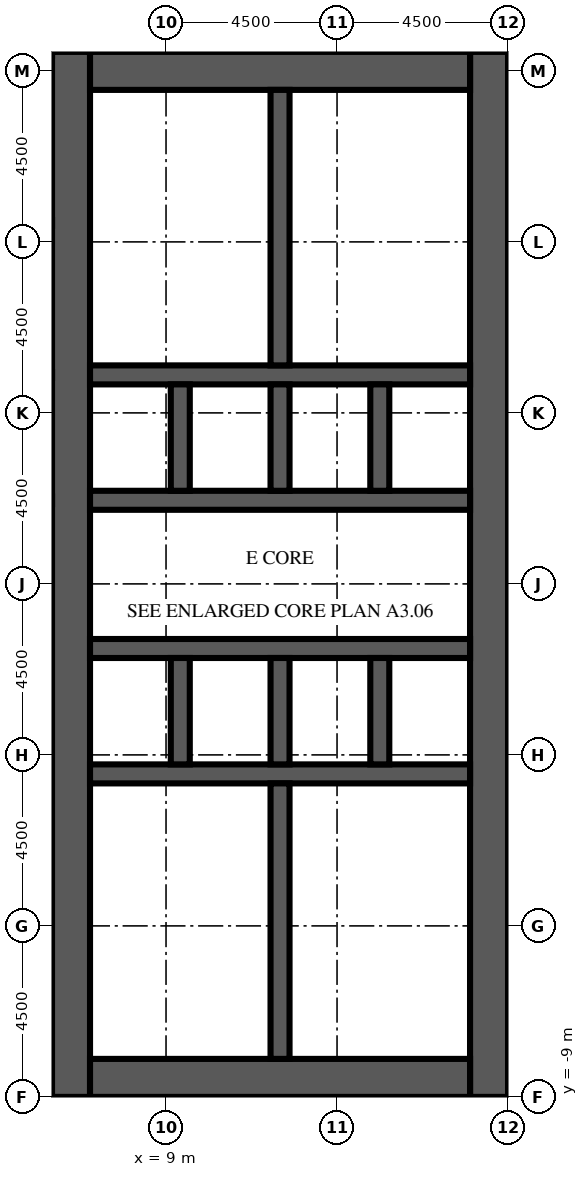
"""IFC4 building model, lengths in metres.
Left out: names, types, materials, properties, quantities, classifications, styles, units other than length and angle.
Written with IfcOpenShell. Run it as: python <this file> out.ifc"""

import sys

from ifc_helpers import new_model, si_unit, direction, frame, frame_2d, origin, place, context, subcontext, project, spatial, rectangle, extrude, element, fill, save


model = new_model("IFC4")
c1 = context("Model", 3, precision=1e-05, world=origin(), true_north=direction((0.0, 1.0)))
c2 = subcontext(c1, "Body", "Model", "MODEL_VIEW")
j1 = project(units=[si_unit("LENGTHUNIT", "METRE"), si_unit("PLANEANGLEUNIT", "RADIAN")], contexts=[c1])
p1 = place(None, origin())
s1 = spatial("IfcSite", under=j1, at=p1, CompositionType="ELEMENT")
p2 = place(p1, origin())
s2 = spatial("IfcBuilding", under=s1, at=p2, CompositionType="ELEMENT")
p3 = place(p2, frame((0.0, 0.0, 31.8)))
s3 = spatial("IfcBuildingStorey", under=s2, at=p3, CompositionType="ELEMENT", Elevation=31.8)
p4 = place(p3, frame((6.5, -9.0, 0.0), z_axis=(0.0, 0.0, 1.0), x_axis=(0.0, 1.0, 0.0)))
e1 = element("IfcWall", 1, at=p4, inside=s3, PredefinedType="SHEAR", context=c2, shape_type="SweptSolid", body=[
    extrude(rectangle(XDim=27.5, YDim=1.0, at=frame_2d((13.75, 0.0))), origin(), (0.0, 0.0, 1.0), 4.1),
])
p5 = place(p4, frame((12.55, 0.0, 0.0)))
e2 = element("IfcOpeningElement", 2, at=p5, cuts=e1, PredefinedType="OPENING", context=c2, shape_type="SweptSolid", body=[
    extrude(rectangle(XDim=2.4, YDim=2.4, at=frame_2d((1.2, 1.2))), frame((0.0, 0.51, 0.0), z_axis=(0.0, -1.0, 0.0), x_axis=(1.0, 0.0, 0.0)), (0.0, 0.0, 1.0), 1.02),
])
p6 = place(p4, frame((4.025, 0.0, 0.0)))
e3 = element("IfcOpeningElement", 3, at=p6, cuts=e1, PredefinedType="OPENING", context=c2, shape_type="SweptSolid", body=[
    extrude(rectangle(XDim=1.2, YDim=2.1, at=frame_2d((0.6, 1.05))), frame((0.0, 0.51, 0.0), z_axis=(0.0, -1.0, 0.0), x_axis=(1.0, 0.0, 0.0)), (0.0, 0.0, 1.0), 1.02),
])
p7 = place(p4, frame((19.475, 0.0, 0.0)))
e4 = element("IfcOpeningElement", 4, at=p7, cuts=e1, PredefinedType="OPENING", context=c2, shape_type="SweptSolid", body=[
    extrude(rectangle(XDim=1.0, YDim=2.1, at=frame_2d((0.5, 1.05))), frame((0.0, 0.51, 0.0), z_axis=(0.0, -1.0, 0.0), x_axis=(1.0, 0.0, 0.0)), (0.0, 0.0, 1.0), 1.02),
])
p8 = place(p4, frame((21.106, 0.0, 0.0)))
e5 = element("IfcOpeningElement", 5, at=p8, cuts=e1, PredefinedType="OPENING", context=c2, shape_type="SweptSolid", body=[
    extrude(rectangle(XDim=1.0, YDim=2.1, at=frame_2d((0.5, 1.05))), frame((0.0, 0.51, 0.0), z_axis=(0.0, -1.0, 0.0), x_axis=(1.0, 0.0, 0.0)), (0.0, 0.0, 1.0), 1.02),
])
p9 = place(p4, frame((23.1, 0.0, 0.0)))
e6 = element("IfcOpeningElement", 6, at=p9, cuts=e1, PredefinedType="OPENING", context=c2, shape_type="SweptSolid", body=[
    extrude(rectangle(XDim=1.0, YDim=2.1, at=frame_2d((0.5, 1.05))), frame((0.0, 0.51, 0.0), z_axis=(0.0, -1.0, 0.0), x_axis=(1.0, 0.0, 0.0)), (0.0, 0.0, 1.0), 1.02),
])
p10 = place(p4, frame((25.094, 0.0, 0.0)))
e7 = element("IfcOpeningElement", 7, at=p10, cuts=e1, PredefinedType="OPENING", context=c2, shape_type="SweptSolid", body=[
    extrude(rectangle(XDim=1.0, YDim=2.1, at=frame_2d((0.5, 1.05))), frame((0.0, 0.51, 0.0), z_axis=(0.0, -1.0, 0.0), x_axis=(1.0, 0.0, 0.0)), (0.0, 0.0, 1.0), 1.02),
])
p11 = place(p3, frame((17.5, -9.0, 0.0), z_axis=(0.0, 0.0, 1.0), x_axis=(0.0, 1.0, 0.0)))
e8 = element("IfcWall", 8, at=p11, inside=s3, PredefinedType="SHEAR", context=c2, shape_type="SweptSolid", body=[
    extrude(rectangle(XDim=27.5, YDim=1.0, at=frame_2d((13.75, 0.0))), origin(), (0.0, 0.0, 1.0), 4.1),
])
p12 = place(p11, frame((12.55, 0.0, 0.0)))
e9 = element("IfcOpeningElement", 9, at=p12, cuts=e8, PredefinedType="OPENING", context=c2, shape_type="SweptSolid", body=[
    extrude(rectangle(XDim=2.4, YDim=2.4, at=frame_2d((1.2, 1.2))), frame((0.0, 0.51, 0.0), z_axis=(0.0, -1.0, 0.0), x_axis=(1.0, 0.0, 0.0)), (0.0, 0.0, 1.0), 1.02),
])
p13 = place(p11, frame((6.825, 0.0, 0.0)))
e10 = element("IfcOpeningElement", 10, at=p13, cuts=e8, PredefinedType="OPENING", context=c2, shape_type="SweptSolid", body=[
    extrude(rectangle(XDim=1.2, YDim=2.1, at=frame_2d((0.6, 1.05))), frame((0.0, 0.51, 0.0), z_axis=(0.0, -1.0, 0.0), x_axis=(1.0, 0.0, 0.0)), (0.0, 0.0, 1.0), 1.02),
])
p14 = place(p11, frame((19.475, 0.0, 0.0)))
e11 = element("IfcOpeningElement", 11, at=p14, cuts=e8, PredefinedType="OPENING", context=c2, shape_type="SweptSolid", body=[
    extrude(rectangle(XDim=1.2, YDim=2.1, at=frame_2d((0.6, 1.05))), frame((0.0, 0.51, 0.0), z_axis=(0.0, -1.0, 0.0), x_axis=(1.0, 0.0, 0.0)), (0.0, 0.0, 1.0), 1.02),
])
for number, where, z_axis, x_axis in (
    (12, (7.0, -8.5, 0.0), (0.0, 0.0, 1.0), (1.0, 0.0, 0.0)),
    (13, (7.0, 18.0, 0.0), (0.0, 0.0, 1.0), (1.0, 0.0, 0.0)),
):
    element("IfcWall", number, at=place(p3, frame(where, z_axis=z_axis, x_axis=x_axis)), inside=s3, PredefinedType="SHEAR", context=c2, shape_type="SweptSolid", body=[
        extrude(rectangle(XDim=10.0, YDim=1.0, at=frame_2d((5.0, 0.0))), origin(), (0.0, 0.0, 1.0), 4.1),
    ])
p15 = place(p3, frame((7.0, -0.5, 0.0), z_axis=(0.0, 0.0, 1.0), x_axis=(1.0, 0.0, 0.0)))
e14 = element("IfcWall", 14, at=p15, inside=s3, PredefinedType="SHEAR", context=c2, shape_type="SweptSolid", body=[
    extrude(rectangle(XDim=10.0, YDim=0.5, at=frame_2d((5.0, 0.0))), origin(), (0.0, 0.0, 1.0), 4.1),
])
p16 = place(p3, frame((7.0, 2.8, 0.0), z_axis=(0.0, 0.0, 1.0), x_axis=(1.0, 0.0, 0.0)))
e15 = element("IfcWall", 15, at=p16, inside=s3, PredefinedType="SHEAR", context=c2, shape_type="SweptSolid", body=[
    extrude(rectangle(XDim=10.0, YDim=0.5, at=frame_2d((5.0, 0.0))), origin(), (0.0, 0.0, 1.0), 4.1),
])
p17 = place(p16, frame((0.512, 0.0, 0.0)))
e16 = element("IfcOpeningElement", 16, at=p17, cuts=e15, PredefinedType="OPENING", context=c2, shape_type="SweptSolid", body=[
    extrude(rectangle(XDim=1.1, YDim=2.1, at=frame_2d((0.55, 1.05))), frame((0.0, 0.26, 0.0), z_axis=(0.0, -1.0, 0.0), x_axis=(1.0, 0.0, 0.0)), (0.0, 0.0, 1.0), 0.52),
])
p18 = place(p16, frame((3.137, 0.0, 0.0)))
e17 = element("IfcOpeningElement", 17, at=p18, cuts=e15, PredefinedType="OPENING", context=c2, shape_type="SweptSolid", body=[
    extrude(rectangle(XDim=1.1, YDim=2.1, at=frame_2d((0.55, 1.05))), frame((0.0, 0.26, 0.0), z_axis=(0.0, -1.0, 0.0), x_axis=(1.0, 0.0, 0.0)), (0.0, 0.0, 1.0), 0.52),
])
p19 = place(p16, frame((8.387, 0.0, 0.0)))
e18 = element("IfcOpeningElement", 18, at=p19, cuts=e15, PredefinedType="OPENING", context=c2, shape_type="SweptSolid", body=[
    extrude(rectangle(XDim=1.1, YDim=2.1, at=frame_2d((0.55, 1.05))), frame((0.0, 0.26, 0.0), z_axis=(0.0, -1.0, 0.0), x_axis=(1.0, 0.0, 0.0)), (0.0, 0.0, 1.0), 0.52),
])
p20 = place(p3, frame((7.0, 6.7, 0.0), z_axis=(0.0, 0.0, 1.0), x_axis=(1.0, 0.0, 0.0)))
e19 = element("IfcWall", 19, at=p20, inside=s3, PredefinedType="SHEAR", context=c2, shape_type="SweptSolid", body=[
    extrude(rectangle(XDim=10.0, YDim=0.5, at=frame_2d((5.0, 0.0))), origin(), (0.0, 0.0, 1.0), 4.1),
])
p21 = place(p20, frame((0.512, 0.0, 0.0)))
e20 = element("IfcOpeningElement", 20, at=p21, cuts=e19, PredefinedType="OPENING", context=c2, shape_type="SweptSolid", body=[
    extrude(rectangle(XDim=1.1, YDim=2.1, at=frame_2d((0.55, 1.05))), frame((0.0, 0.26, 0.0), z_axis=(0.0, -1.0, 0.0), x_axis=(1.0, 0.0, 0.0)), (0.0, 0.0, 1.0), 0.52),
])
p22 = place(p20, frame((3.188, 0.0, 0.0)))
e21 = element("IfcOpeningElement", 21, at=p22, cuts=e19, PredefinedType="OPENING", context=c2, shape_type="SweptSolid", body=[
    extrude(rectangle(XDim=1.0, YDim=2.1, at=frame_2d((0.5, 1.05))), frame((0.0, 0.26, 0.0), z_axis=(0.0, -1.0, 0.0), x_axis=(1.0, 0.0, 0.0)), (0.0, 0.0, 1.0), 0.52),
])
p23 = place(p20, frame((5.812, 0.0, 0.0)))
e22 = element("IfcOpeningElement", 22, at=p23, cuts=e19, PredefinedType="OPENING", context=c2, shape_type="SweptSolid", body=[
    extrude(rectangle(XDim=1.0, YDim=2.1, at=frame_2d((0.5, 1.05))), frame((0.0, 0.26, 0.0), z_axis=(0.0, -1.0, 0.0), x_axis=(1.0, 0.0, 0.0)), (0.0, 0.0, 1.0), 0.52),
])
p24 = place(p20, frame((8.438, 0.0, 0.0)))
e23 = element("IfcOpeningElement", 23, at=p24, cuts=e19, PredefinedType="OPENING", context=c2, shape_type="SweptSolid", body=[
    extrude(rectangle(XDim=1.0, YDim=2.1, at=frame_2d((0.5, 1.05))), frame((0.0, 0.26, 0.0), z_axis=(0.0, -1.0, 0.0), x_axis=(1.0, 0.0, 0.0)), (0.0, 0.0, 1.0), 0.52),
])
p25 = place(p3, frame((7.0, 10.0, 0.0), z_axis=(0.0, 0.0, 1.0), x_axis=(1.0, 0.0, 0.0)))
e24 = element("IfcWall", 24, at=p25, inside=s3, PredefinedType="SHEAR", context=c2, shape_type="SweptSolid", body=[
    extrude(rectangle(XDim=10.0, YDim=0.5, at=frame_2d((5.0, 0.0))), origin(), (0.0, 0.0, 1.0), 4.1),
])
for number, where, z_axis, x_axis in (
    (25, (9.375, -0.25, 0.0), (0.0, 0.0, 1.0), (0.0, 1.0, 0.0)),
    (26, (9.375, 6.95, 0.0), (0.0, 0.0, 1.0), (0.0, 1.0, 0.0)),
    (27, (12.0, -0.25, 0.0), (0.0, 0.0, 1.0), (0.0, 1.0, 0.0)),
    (28, (12.0, 6.95, 0.0), (0.0, 0.0, 1.0), (0.0, 1.0, 0.0)),
    (29, (14.625, -0.25, 0.0), (0.0, 0.0, 1.0), (0.0, 1.0, 0.0)),
    (30, (14.625, 6.95, 0.0), (0.0, 0.0, 1.0), (0.0, 1.0, 0.0)),
):
    element("IfcWall", number, at=place(p3, frame(where, z_axis=z_axis, x_axis=x_axis)), inside=s3, PredefinedType="SHEAR", context=c2, shape_type="SweptSolid", body=[
        extrude(rectangle(XDim=2.8, YDim=0.5, at=frame_2d((1.4, 0.0))), origin(), (0.0, 0.0, 1.0), 4.1),
    ])
for number, where, z_axis, x_axis in (
    (31, (12.0, -8.0, 0.0), (0.0, 0.0, 1.0), (0.0, 1.0, 0.0)),
    (32, (12.0, 10.25, 0.0), (0.0, 0.0, 1.0), (0.0, 1.0, 0.0)),
):
    element("IfcWall", number, at=place(p3, frame(where, z_axis=z_axis, x_axis=x_axis)), inside=s3, PredefinedType="SHEAR", context=c2, shape_type="SweptSolid", body=[
        extrude(rectangle(XDim=7.25, YDim=0.5, at=frame_2d((3.625, 0.0))), origin(), (0.0, 0.0, 1.0), 4.1),
    ])
p26 = place(p3, frame((7.0, -5.825, 0.0), z_axis=(0.0, 0.0, 1.0), x_axis=(1.0, 0.0, 0.0)))
e33 = element("IfcWall", 33, at=p26, inside=s3, PredefinedType="PARTITIONING", context=c2, shape_type="SweptSolid", body=[
    extrude(rectangle(XDim=1.6, YDim=0.1, at=frame_2d((0.8, 0.0))), origin(), (0.0, 0.0, 1.0), 3.5),
])
p27 = place(p26, frame((0.3, 0.0, 0.0)))
e34 = element("IfcOpeningElement", 34, at=p27, cuts=e33, PredefinedType="OPENING", context=c2, shape_type="SweptSolid", body=[
    extrude(rectangle(XDim=1.0, YDim=2.1, at=frame_2d((0.5, 1.05))), frame((0.0, 0.06, 0.0), z_axis=(0.0, -1.0, 0.0), x_axis=(1.0, 0.0, 0.0)), (0.0, 0.0, 1.0), 0.12),
])
p28 = place(p3, frame((7.0, -2.925, 0.0), z_axis=(0.0, 0.0, 1.0), x_axis=(1.0, 0.0, 0.0)))
e35 = element("IfcWall", 35, at=p28, inside=s3, PredefinedType="PARTITIONING", context=c2, shape_type="SweptSolid", body=[
    extrude(rectangle(XDim=1.6, YDim=0.1, at=frame_2d((0.8, 0.0))), origin(), (0.0, 0.0, 1.0), 3.5),
])
p29 = place(p28, frame((0.3, 0.0, 0.0)))
e36 = element("IfcOpeningElement", 36, at=p29, cuts=e35, PredefinedType="OPENING", context=c2, shape_type="SweptSolid", body=[
    extrude(rectangle(XDim=1.0, YDim=2.1, at=frame_2d((0.5, 1.05))), frame((0.0, 0.06, 0.0), z_axis=(0.0, -1.0, 0.0), x_axis=(1.0, 0.0, 0.0)), (0.0, 0.0, 1.0), 0.12),
])
p30 = place(p3, frame((8.6, -5.825, 0.0), z_axis=(0.0, 0.0, 1.0), x_axis=(0.0, 1.0, 0.0)))
e37 = element("IfcWall", 37, at=p30, inside=s3, PredefinedType="PARTITIONING", context=c2, shape_type="SweptSolid", body=[
    extrude(rectangle(XDim=2.9, YDim=0.1, at=frame_2d((1.45, 0.0))), origin(), (0.0, 0.0, 1.0), 3.5),
])
p31 = place(p30, frame((0.95, 0.0, 0.0)))
e38 = element("IfcOpeningElement", 38, at=p31, cuts=e37, PredefinedType="OPENING", context=c2, shape_type="SweptSolid", body=[
    extrude(rectangle(XDim=1.0, YDim=2.1, at=frame_2d((0.5, 1.05))), frame((0.0, 0.06, 0.0), z_axis=(0.0, -1.0, 0.0), x_axis=(1.0, 0.0, 0.0)), (0.0, 0.0, 1.0), 0.12),
])
for number, where, z_axis, x_axis in (
    (39, (8.6, -5.825, 0.0), (0.0, 0.0, 1.0), (1.0, 0.0, 0.0)),
    (40, (8.6, -2.925, 0.0), (0.0, 0.0, 1.0), (1.0, 0.0, 0.0)),
):
    element("IfcWall", number, at=place(p3, frame(where, z_axis=z_axis, x_axis=x_axis)), inside=s3, PredefinedType="PARTITIONING", context=c2, shape_type="SweptSolid", body=[
        extrude(rectangle(XDim=3.15, YDim=0.1, at=frame_2d((1.575, 0.0))), origin(), (0.0, 0.0, 1.0), 3.5),
    ])
for number, where, z_axis, x_axis in (
    (41, (7.0, 11.7, 0.0), (0.0, 0.0, 1.0), (1.0, 0.0, 0.0)),
    (42, (7.0, 13.512, 0.0), (0.0, 0.0, 1.0), (1.0, 0.0, 0.0)),
    (43, (7.0, 15.688, 0.0), (0.0, 0.0, 1.0), (1.0, 0.0, 0.0)),
):
    element("IfcWall", number, at=place(p3, frame(where, z_axis=z_axis, x_axis=x_axis)), inside=s3, PredefinedType="PARTITIONING", context=c2, shape_type="SweptSolid", body=[
        extrude(rectangle(XDim=4.75, YDim=0.1, at=frame_2d((2.375, 0.0))), origin(), (0.0, 0.0, 1.0), 3.5),
    ])
p32 = place(p17, origin())
e44 = element("IfcDoor", 44, at=p32, inside=s3, OperationType="DOUBLE_DOOR_SLIDING", PredefinedType="DOOR", context=c2, shape_type="SweptSolid", body=[
    extrude(rectangle(XDim=1.1, YDim=2.1, at=frame_2d((0.55, 1.05))), frame((0.0, 0.025, 0.0), z_axis=(0.0, -1.0, 0.0), x_axis=(1.0, 0.0, 0.0)), (0.0, 0.0, 1.0), 0.05),
])
fill(e16, e44)
p33 = place(p18, origin())
e45 = element("IfcDoor", 45, at=p33, inside=s3, OperationType="DOUBLE_DOOR_SLIDING", PredefinedType="DOOR", context=c2, shape_type="SweptSolid", body=[
    extrude(rectangle(XDim=1.1, YDim=2.1, at=frame_2d((0.55, 1.05))), frame((0.0, 0.025, 0.0), z_axis=(0.0, -1.0, 0.0), x_axis=(1.0, 0.0, 0.0)), (0.0, 0.0, 1.0), 0.05),
])
fill(e17, e45)
p34 = place(p19, origin())
e46 = element("IfcDoor", 46, at=p34, inside=s3, OperationType="DOUBLE_DOOR_SLIDING", PredefinedType="DOOR", context=c2, shape_type="SweptSolid", body=[
    extrude(rectangle(XDim=1.1, YDim=2.1, at=frame_2d((0.55, 1.05))), frame((0.0, 0.025, 0.0), z_axis=(0.0, -1.0, 0.0), x_axis=(1.0, 0.0, 0.0)), (0.0, 0.0, 1.0), 0.05),
])
fill(e18, e46)
p35 = place(p21, origin())
e47 = element("IfcDoor", 47, at=p35, inside=s3, OperationType="DOUBLE_DOOR_SLIDING", PredefinedType="DOOR", context=c2, shape_type="SweptSolid", body=[
    extrude(rectangle(XDim=1.1, YDim=2.1, at=frame_2d((0.55, 1.05))), frame((0.0, 0.025, 0.0), z_axis=(0.0, -1.0, 0.0), x_axis=(1.0, 0.0, 0.0)), (0.0, 0.0, 1.0), 0.05),
])
fill(e20, e47)
p36 = place(p5, origin())
e48 = element("IfcDoor", 48, at=p36, inside=s3, OperationType="DOUBLE_DOOR_DOUBLE_SWING", PredefinedType="DOOR", context=c2, shape_type="SweptSolid", body=[
    extrude(rectangle(XDim=2.4, YDim=2.4, at=frame_2d((1.2, 1.2))), frame((0.0, 0.025, 0.0), z_axis=(0.0, -1.0, 0.0), x_axis=(1.0, 0.0, 0.0)), (0.0, 0.0, 1.0), 0.05),
])
fill(e2, e48)
p37 = place(p12, origin())
e49 = element("IfcDoor", 49, at=p37, inside=s3, OperationType="DOUBLE_DOOR_DOUBLE_SWING", PredefinedType="DOOR", context=c2, shape_type="SweptSolid", body=[
    extrude(rectangle(XDim=2.4, YDim=2.4, at=frame_2d((1.2, 1.2))), frame((0.0, 0.025, 0.0), z_axis=(0.0, -1.0, 0.0), x_axis=(1.0, 0.0, 0.0)), (0.0, 0.0, 1.0), 0.05),
])
fill(e9, e49)
p38 = place(p13, frame((1.2, 0.0, 0.0), z_axis=(0.0, 0.0, 1.0), x_axis=(-1.0, 0.0, 0.0)))
e50 = element("IfcDoor", 50, at=p38, inside=s3, OperationType="SINGLE_SWING_LEFT", PredefinedType="DOOR", context=c2, shape_type="SweptSolid", body=[
    extrude(rectangle(XDim=1.2, YDim=2.1, at=frame_2d((0.6, 1.05))), frame((0.0, 0.025, 0.0), z_axis=(0.0, -1.0, 0.0), x_axis=(1.0, 0.0, 0.0)), (0.0, 0.0, 1.0), 0.05),
])
fill(e10, e50)
p39 = place(p14, frame((1.2, 0.0, 0.0), z_axis=(0.0, 0.0, 1.0), x_axis=(-1.0, 0.0, 0.0)))
e51 = element("IfcDoor", 51, at=p39, inside=s3, OperationType="SINGLE_SWING_LEFT", PredefinedType="DOOR", context=c2, shape_type="SweptSolid", body=[
    extrude(rectangle(XDim=1.2, YDim=2.1, at=frame_2d((0.6, 1.05))), frame((0.0, 0.025, 0.0), z_axis=(0.0, -1.0, 0.0), x_axis=(1.0, 0.0, 0.0)), (0.0, 0.0, 1.0), 0.05),
])
fill(e11, e51)
p40 = place(p22, origin())
e52 = element("IfcDoor", 52, at=p40, inside=s3, OperationType="SINGLE_SWING_RIGHT", PredefinedType="DOOR", context=c2, shape_type="SweptSolid", body=[
    extrude(rectangle(XDim=1.0, YDim=2.1, at=frame_2d((0.5, 1.05))), frame((0.0, 0.025, 0.0), z_axis=(0.0, -1.0, 0.0), x_axis=(1.0, 0.0, 0.0)), (0.0, 0.0, 1.0), 0.05),
])
fill(e21, e52)
p41 = place(p23, origin())
e53 = element("IfcDoor", 53, at=p41, inside=s3, OperationType="SINGLE_SWING_LEFT", PredefinedType="DOOR", context=c2, shape_type="SweptSolid", body=[
    extrude(rectangle(XDim=1.0, YDim=2.1, at=frame_2d((0.5, 1.05))), frame((0.0, 0.025, 0.0), z_axis=(0.0, -1.0, 0.0), x_axis=(1.0, 0.0, 0.0)), (0.0, 0.0, 1.0), 0.05),
])
fill(e22, e53)
p42 = place(p24, origin())
e54 = element("IfcDoor", 54, at=p42, inside=s3, OperationType="SINGLE_SWING_RIGHT", PredefinedType="DOOR", context=c2, shape_type="SweptSolid", body=[
    extrude(rectangle(XDim=1.0, YDim=2.1, at=frame_2d((0.5, 1.05))), frame((0.0, 0.025, 0.0), z_axis=(0.0, -1.0, 0.0), x_axis=(1.0, 0.0, 0.0)), (0.0, 0.0, 1.0), 0.05),
])
fill(e23, e54)
p43 = place(p6, origin())
e55 = element("IfcDoor", 55, at=p43, inside=s3, OperationType="SINGLE_SWING_RIGHT", PredefinedType="DOOR", context=c2, shape_type="SweptSolid", body=[
    extrude(rectangle(XDim=1.2, YDim=2.1, at=frame_2d((0.6, 1.05))), frame((0.0, -0.425, 0.0), z_axis=(0.0, -1.0, 0.0), x_axis=(1.0, 0.0, 0.0)), (0.0, 0.0, 1.0), 0.05),
])
fill(e3, e55)
p44 = place(p27, origin())
e56 = element("IfcDoor", 56, at=p44, inside=s3, OperationType="SINGLE_SWING_LEFT", PredefinedType="DOOR", context=c2, shape_type="SweptSolid", body=[
    extrude(rectangle(XDim=1.0, YDim=2.1, at=frame_2d((0.5, 1.05))), frame((0.0, 0.025, 0.0), z_axis=(0.0, -1.0, 0.0), x_axis=(1.0, 0.0, 0.0)), (0.0, 0.0, 1.0), 0.05),
])
fill(e34, e56)
p45 = place(p29, origin())
e57 = element("IfcDoor", 57, at=p45, inside=s3, OperationType="SINGLE_SWING_RIGHT", PredefinedType="DOOR", context=c2, shape_type="SweptSolid", body=[
    extrude(rectangle(XDim=1.0, YDim=2.1, at=frame_2d((0.5, 1.05))), frame((0.0, 0.025, 0.0), z_axis=(0.0, -1.0, 0.0), x_axis=(1.0, 0.0, 0.0)), (0.0, 0.0, 1.0), 0.05),
])
fill(e36, e57)
p46 = place(p31, origin())
e58 = element("IfcDoor", 58, at=p46, inside=s3, OperationType="SINGLE_SWING_LEFT", PredefinedType="DOOR", context=c2, shape_type="SweptSolid", body=[
    extrude(rectangle(XDim=1.0, YDim=2.1, at=frame_2d((0.5, 1.05))), frame((0.0, 0.025, 0.0), z_axis=(0.0, -1.0, 0.0), x_axis=(1.0, 0.0, 0.0)), (0.0, 0.0, 1.0), 0.05),
])
fill(e38, e58)
p47 = place(p7, origin())
e59 = element("IfcDoor", 59, at=p47, inside=s3, OperationType="SINGLE_SWING_RIGHT", PredefinedType="DOOR", context=c2, shape_type="SweptSolid", body=[
    extrude(rectangle(XDim=1.0, YDim=2.1, at=frame_2d((0.5, 1.05))), frame((0.0, -0.425, 0.0), z_axis=(0.0, -1.0, 0.0), x_axis=(1.0, 0.0, 0.0)), (0.0, 0.0, 1.0), 0.05),
])
fill(e4, e59)
p48 = place(p8, origin())
e60 = element("IfcDoor", 60, at=p48, inside=s3, OperationType="SINGLE_SWING_LEFT", PredefinedType="DOOR", context=c2, shape_type="SweptSolid", body=[
    extrude(rectangle(XDim=1.0, YDim=2.1, at=frame_2d((0.5, 1.05))), frame((0.0, -0.425, 0.0), z_axis=(0.0, -1.0, 0.0), x_axis=(1.0, 0.0, 0.0)), (0.0, 0.0, 1.0), 0.05),
])
fill(e5, e60)
p49 = place(p9, origin())
e61 = element("IfcDoor", 61, at=p49, inside=s3, OperationType="SINGLE_SWING_RIGHT", PredefinedType="DOOR", context=c2, shape_type="SweptSolid", body=[
    extrude(rectangle(XDim=1.0, YDim=2.1, at=frame_2d((0.5, 1.05))), frame((0.0, -0.425, 0.0), z_axis=(0.0, -1.0, 0.0), x_axis=(1.0, 0.0, 0.0)), (0.0, 0.0, 1.0), 0.05),
])
fill(e6, e61)
p50 = place(p10, origin())
e62 = element("IfcDoor", 62, at=p50, inside=s3, OperationType="SINGLE_SWING_LEFT", PredefinedType="DOOR", context=c2, shape_type="SweptSolid", body=[
    extrude(rectangle(XDim=1.0, YDim=2.1, at=frame_2d((0.5, 1.05))), frame((0.0, -0.425, 0.0), z_axis=(0.0, -1.0, 0.0), x_axis=(1.0, 0.0, 0.0)), (0.0, 0.0, 1.0), 0.05),
])
fill(e7, e62)
save(model, sys.argv[1])
